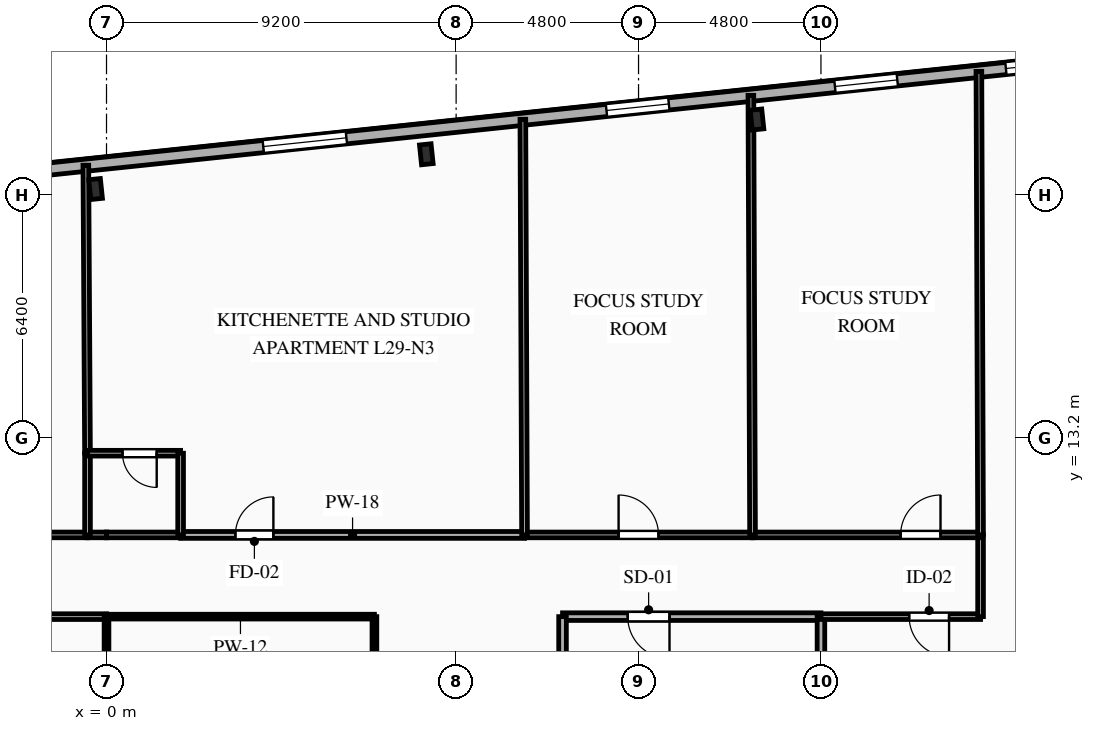
"""IFC4 building model, lengths in metres.
Left out: names, types, materials, properties, quantities, classifications, styles, units other than length and angle.
Written with IfcOpenShell. Run it as: python <this file> out.ifc"""

import sys

from ifc_helpers import new_model, si_unit, direction, frame, frame_2d, origin, origin_2d, place, context, subcontext, project, spatial, rectangle, i_section, extrude, element, fill, save


model = new_model("IFC4")
c1 = context("Model", 3, precision=1e-05, world=origin(), true_north=direction((0.0, 1.0)))
c2 = subcontext(c1, "Body", "Model", "MODEL_VIEW")
j1 = project(units=[si_unit("LENGTHUNIT", "METRE"), si_unit("PLANEANGLEUNIT", "RADIAN")], contexts=[c1])
p1 = place(None, origin())
s1 = spatial("IfcSite", under=j1, at=p1, CompositionType="ELEMENT")
p2 = place(p1, origin())
s2 = spatial("IfcBuilding", under=s1, at=p2, CompositionType="ELEMENT")
p3 = place(p2, frame((0.0, 0.0, 105.8)))
s3 = spatial("IfcBuildingStorey", under=s2, at=p3, CompositionType="ELEMENT", Elevation=105.8)
for number, where, z_axis, x_axis in (
    (1, (17.117, 21.58, 0.0), (0.0, 0.0, 1.0), (0.995, 0.105, 0.0)),
    (2, (8.415, 20.666, 0.0), (0.0, 0.0, 1.0), (0.995, 0.105, 0.0)),
    (3, (-0.287, 19.751, 0.0), (0.0, 0.0, 1.0), (0.995, 0.105, 0.0)),
):
    element("IfcColumn", number, at=place(p3, frame(where, z_axis=z_axis, x_axis=x_axis)), inside=s3, PredefinedType="COLUMN", context=c2, shape_type="SweptSolid", body=[
        extrude(i_section(OverallWidth=0.306, OverallDepth=0.524, WebThickness=0.021, FlangeThickness=0.04, FilletRadius=0.027, at=origin_2d()), origin(), (0.0, 0.0, 1.0), 3.35),
    ])
p4 = place(p3, frame((-27.107, 17.586, 0.0), z_axis=(0.0, 0.0, 1.0), x_axis=(0.994521628355, 0.104531003701, 0.0)))
e4 = element("IfcWall", 4, at=p4, inside=s3, PredefinedType="SOLIDWALL", context=c2, shape_type="SweptSolid", body=[
    extrude(rectangle(XDim=53.8, YDim=0.32, at=frame_2d((26.9, 0.0))), origin(), (0.0, 0.0, 1.0), 3.045),
])
p5 = place(p4, frame((1.482, 0.0, 0.85)))
e5 = element("IfcOpeningElement", 5, at=p5, cuts=e4, PredefinedType="OPENING", context=c2, shape_type="SweptSolid", body=[
    extrude(rectangle(XDim=1.6, YDim=1.85, at=frame_2d((0.8, 0.925))), frame((0.0, 0.17, 0.0), z_axis=(0.0, -1.0, 0.0), x_axis=(1.0, 0.0, 0.0)), (0.0, 0.0, 1.0), 0.34),
])
p6 = place(p4, frame((6.02, 0.0, 0.85)))
e6 = element("IfcOpeningElement", 6, at=p6, cuts=e4, PredefinedType="OPENING", context=c2, shape_type="SweptSolid", body=[
    extrude(rectangle(XDim=1.65, YDim=1.85, at=frame_2d((0.825, 0.925))), frame((0.0, 0.17, 0.0), z_axis=(0.0, -1.0, 0.0), x_axis=(1.0, 0.0, 0.0)), (0.0, 0.0, 1.0), 0.34),
])
p7 = place(p4, frame((11.584, 0.0, 0.85)))
e7 = element("IfcOpeningElement", 7, at=p7, cuts=e4, PredefinedType="OPENING", context=c2, shape_type="SweptSolid", body=[
    extrude(rectangle(XDim=1.65, YDim=1.85, at=frame_2d((0.825, 0.925))), frame((0.0, 0.17, 0.0), z_axis=(0.0, -1.0, 0.0), x_axis=(1.0, 0.0, 0.0)), (0.0, 0.0, 1.0), 0.34),
])
p8 = place(p4, frame((21.336, 0.0, 0.85)))
e8 = element("IfcOpeningElement", 8, at=p8, cuts=e4, PredefinedType="OPENING", context=c2, shape_type="SweptSolid", body=[
    extrude(rectangle(XDim=1.6, YDim=1.85, at=frame_2d((0.8, 0.925))), frame((0.0, 0.17, 0.0), z_axis=(0.0, -1.0, 0.0), x_axis=(1.0, 0.0, 0.0)), (0.0, 0.0, 1.0), 0.34),
])
p9 = place(p4, frame((31.404, 0.0, 0.85)))
e9 = element("IfcOpeningElement", 9, at=p9, cuts=e4, PredefinedType="OPENING", context=c2, shape_type="SweptSolid", body=[
    extrude(rectangle(XDim=2.2, YDim=1.85, at=frame_2d((1.1, 0.925))), frame((0.0, 0.17, 0.0), z_axis=(0.0, -1.0, 0.0), x_axis=(1.0, 0.0, 0.0)), (0.0, 0.0, 1.0), 0.34),
])
p10 = place(p4, frame((40.486, 0.0, 0.85)))
e10 = element("IfcOpeningElement", 10, at=p10, cuts=e4, PredefinedType="OPENING", context=c2, shape_type="SweptSolid", body=[
    extrude(rectangle(XDim=1.65, YDim=1.85, at=frame_2d((0.825, 0.925))), frame((0.0, 0.17, 0.0), z_axis=(0.0, -1.0, 0.0), x_axis=(1.0, 0.0, 0.0)), (0.0, 0.0, 1.0), 0.34),
])
p11 = place(p4, frame((46.53, 0.0, 0.85)))
e11 = element("IfcOpeningElement", 11, at=p11, cuts=e4, PredefinedType="OPENING", context=c2, shape_type="SweptSolid", body=[
    extrude(rectangle(XDim=1.65, YDim=1.85, at=frame_2d((0.825, 0.925))), frame((0.0, 0.17, 0.0), z_axis=(0.0, -1.0, 0.0), x_axis=(1.0, 0.0, 0.0)), (0.0, 0.0, 1.0), 0.34),
])
p12 = place(p4, frame((51.054, 0.0, 0.85)))
e12 = element("IfcOpeningElement", 12, at=p12, cuts=e4, PredefinedType="OPENING", context=c2, shape_type="SweptSolid", body=[
    extrude(rectangle(XDim=1.65, YDim=1.85, at=frame_2d((0.825, 0.925))), frame((0.0, 0.17, 0.0), z_axis=(0.0, -1.0, 0.0), x_axis=(1.0, 0.0, 0.0)), (0.0, 0.0, 1.0), 0.34),
])
p13 = place(p3, frame((18.8, 8.5, 0.0), z_axis=(0.0, 0.0, 1.0), x_axis=(-1.0, 0.0, 0.0)))
e13 = element("IfcWall", 13, at=p13, inside=s3, PredefinedType="PARTITIONING", context=c2, shape_type="SweptSolid", body=[
    extrude(rectangle(XDim=6.8, YDim=0.2, at=frame_2d((3.4, 0.0))), origin(), (0.0, 0.0, 1.0), 3.045),
])
p14 = place(p13, frame((3.985, 0.0, 0.0)))
e14 = element("IfcOpeningElement", 14, at=p14, cuts=e13, PredefinedType="OPENING", context=c2, shape_type="SweptSolid", body=[
    extrude(rectangle(XDim=1.1, YDim=2.15, at=frame_2d((0.55, 1.075))), frame((0.0, 0.11, 0.0), z_axis=(0.0, -1.0, 0.0), x_axis=(1.0, 0.0, 0.0)), (0.0, 0.0, 1.0), 0.22),
])
p15 = place(p3, frame((12.0, 8.5, 0.0), z_axis=(0.0, 0.0, 1.0), x_axis=(0.0, -1.0, 0.0)))
e15 = element("IfcWall", 15, at=p15, inside=s3, PredefinedType="PARTITIONING", context=c2, shape_type="SweptSolid", body=[
    extrude(rectangle(XDim=2.9, YDim=0.2, at=frame_2d((1.45, 0.0))), origin(), (0.0, 0.0, 1.0), 3.045),
])
p16 = place(p3, frame((18.8, 5.6, 0.0), z_axis=(0.0, 0.0, 1.0), x_axis=(0.0, 1.0, 0.0)))
e16 = element("IfcWall", 16, at=p16, inside=s3, PredefinedType="PARTITIONING", context=c2, shape_type="SweptSolid", body=[
    extrude(rectangle(XDim=2.9, YDim=0.2, at=frame_2d((1.45, 0.0))), origin(), (0.0, 0.0, 1.0), 2.53),
])
p17 = place(p3, frame((-9.65, 10.65, 0.0), z_axis=(0.0, 0.0, 1.0), x_axis=(1.0, 0.0, 0.0)))
e17 = element("IfcWall", 17, at=p17, inside=s3, PredefinedType="PARTITIONING", context=c2, shape_type="SweptSolid", body=[
    extrude(rectangle(XDim=9.15, YDim=0.15, at=frame_2d((4.575, 0.0))), origin(), (0.0, 0.0, 1.0), 3.045),
])
p18 = place(p17, frame((6.74, 0.0, 0.0)))
e18 = element("IfcOpeningElement", 18, at=p18, cuts=e17, PredefinedType="OPENING", context=c2, shape_type="SweptSolid", body=[
    extrude(rectangle(XDim=0.95, YDim=2.1, at=frame_2d((0.475, 1.05))), frame((0.0, 0.085, 0.0), z_axis=(0.0, -1.0, 0.0), x_axis=(1.0, 0.0, 0.0)), (0.0, 0.0, 1.0), 0.17),
])
p19 = place(p3, frame((-0.5, 10.65, 0.0), z_axis=(0.0, 0.0, 1.0), x_axis=(1.0, 0.0, 0.0)))
e19 = element("IfcWall", 19, at=p19, inside=s3, PredefinedType="PLUMBINGWALL", context=c2, shape_type="SweptSolid", body=[
    extrude(rectangle(XDim=0.5, YDim=0.15, at=frame_2d((0.25, 0.0))), origin(), (0.0, 0.0, 1.0), 3.045),
])
p20 = place(p3, frame((0.0, 8.5, 0.0), z_axis=(0.0, 0.0, 1.0), x_axis=(-1.0, 0.0, 0.0)))
e20 = element("IfcWall", 20, at=p20, inside=s3, PredefinedType="PARTITIONING", context=c2, shape_type="SweptSolid", body=[
    extrude(rectangle(XDim=7.05, YDim=0.15, at=frame_2d((3.525, 0.0))), origin(), (0.0, 0.0, 1.0), 3.045),
])
p21 = place(p3, frame((23.0, 8.5, 0.0), z_axis=(0.0, 0.0, 1.0), x_axis=(-1.0, 0.0, 0.0)))
e21 = element("IfcWall", 21, at=p21, inside=s3, PredefinedType="PARTITIONING", context=c2, shape_type="SweptSolid", body=[
    extrude(rectangle(XDim=4.2, YDim=0.15, at=frame_2d((2.1, 0.0))), origin(), (0.0, 0.0, 1.0), 3.045),
])
p22 = place(p21, frame((0.829, 0.0, 0.0)))
e22 = element("IfcOpeningElement", 22, at=p22, cuts=e21, PredefinedType="OPENING", context=c2, shape_type="SweptSolid", body=[
    extrude(rectangle(XDim=1.05, YDim=2.15, at=frame_2d((0.525, 1.075))), frame((0.0, 0.085, 0.0), z_axis=(0.0, -1.0, 0.0), x_axis=(1.0, 0.0, 0.0)), (0.0, 0.0, 1.0), 0.17),
])
p23 = place(p3, frame((23.0, 10.65, 0.0), z_axis=(0.0, 0.0, 1.0), x_axis=(0.0, -1.0, 0.0)))
e23 = element("IfcWall", 23, at=p23, inside=s3, PredefinedType="PARTITIONING", context=c2, shape_type="SweptSolid", body=[
    extrude(rectangle(XDim=2.15, YDim=0.15, at=frame_2d((1.075, 0.0))), origin(), (0.0, 0.0, 1.0), 3.045),
])
p24 = place(p3, frame((1.95, 10.65, 0.0), z_axis=(0.0, 0.0, 1.0), x_axis=(1.0, 0.0, 0.0)))
e24 = element("IfcWall", 24, at=p24, inside=s3, PredefinedType="PARTITIONING", context=c2, shape_type="SweptSolid", body=[
    extrude(rectangle(XDim=9.05, YDim=0.18, at=frame_2d((4.525, 0.0))), origin(), (0.0, 0.0, 1.0), 3.045),
])
p25 = place(p24, frame((1.441, 0.0, 0.0)))
e25 = element("IfcOpeningElement", 25, at=p25, cuts=e24, PredefinedType="OPENING", context=c2, shape_type="SweptSolid", body=[
    extrude(rectangle(XDim=1.0, YDim=2.15, at=frame_2d((0.5, 1.075))), frame((0.0, 0.1, 0.0), z_axis=(0.0, -1.0, 0.0), x_axis=(1.0, 0.0, 0.0)), (0.0, 0.0, 1.0), 0.2),
])
p26 = place(p3, frame((0.0, 10.65, 0.0), z_axis=(0.0, 0.0, 1.0), x_axis=(1.0, 0.0, 0.0)))
e26 = element("IfcWall", 26, at=p26, inside=s3, PredefinedType="PLUMBINGWALL", context=c2, shape_type="SweptSolid", body=[
    extrude(rectangle(XDim=1.95, YDim=0.15, at=frame_2d((0.975, 0.0))), origin(), (0.0, 0.0, 1.0), 3.045),
])
p27 = place(p3, frame((11.0, 10.65, 0.0), z_axis=(0.0, 0.0, 1.0), x_axis=(1.0, 0.0, 0.0)))
e27 = element("IfcWall", 27, at=p27, inside=s3, PredefinedType="PARTITIONING", context=c2, shape_type="SweptSolid", body=[
    extrude(rectangle(XDim=6.0, YDim=0.15, at=frame_2d((3.0, 0.0))), origin(), (0.0, 0.0, 1.0), 3.045),
])
p28 = place(p27, frame((2.475, 0.0, 0.0)))
e28 = element("IfcOpeningElement", 28, at=p28, cuts=e27, PredefinedType="OPENING", context=c2, shape_type="SweptSolid", body=[
    extrude(rectangle(XDim=1.05, YDim=2.15, at=frame_2d((0.525, 1.075))), frame((0.0, 0.085, 0.0), z_axis=(0.0, -1.0, 0.0), x_axis=(1.0, 0.0, 0.0)), (0.0, 0.0, 1.0), 0.17),
])
p29 = place(p3, frame((17.0, 10.65, 0.0), z_axis=(0.0, 0.0, 1.0), x_axis=(1.0, 0.0, 0.0)))
e29 = element("IfcWall", 29, at=p29, inside=s3, PredefinedType="PARTITIONING", context=c2, shape_type="SweptSolid", body=[
    extrude(rectangle(XDim=6.0, YDim=0.15, at=frame_2d((3.0, 0.0))), origin(), (0.0, 0.0, 1.0), 3.045),
])
p30 = place(p29, frame((3.896, 0.0, 0.0)))
e30 = element("IfcOpeningElement", 30, at=p30, cuts=e29, PredefinedType="OPENING", context=c2, shape_type="SweptSolid", body=[
    extrude(rectangle(XDim=1.05, YDim=2.15, at=frame_2d((0.525, 1.075))), frame((0.0, 0.085, 0.0), z_axis=(0.0, -1.0, 0.0), x_axis=(1.0, 0.0, 0.0)), (0.0, 0.0, 1.0), 0.17),
])
p31 = place(p3, frame((7.05, 8.5, 0.0), z_axis=(0.0, 0.0, 1.0), x_axis=(-1.0, 0.0, 0.0)))
e31 = element("IfcWall", 31, at=p31, inside=s3, PredefinedType="PARTITIONING", context=c2, shape_type="SweptSolid", body=[
    extrude(rectangle(XDim=7.05, YDim=0.125, at=frame_2d((3.525, 0.0))), origin(), (0.0, 0.0, 1.0), 3.045),
])
p32 = place(p3, frame((7.05, -5.6, 0.0), z_axis=(0.0, 0.0, 1.0), x_axis=(0.0, 1.0, 0.0)))
e32 = element("IfcWall", 32, at=p32, inside=s3, PredefinedType="PARTITIONING", context=c2, shape_type="SweptSolid", body=[
    extrude(rectangle(XDim=14.1, YDim=0.125, at=frame_2d((7.05, 0.0))), origin(), (0.0, 0.0, 1.0), 3.045),
])
p33 = place(p32, frame((5.076, 0.0, 0.0)))
e33 = element("IfcOpeningElement", 33, at=p33, cuts=e32, PredefinedType="OPENING", context=c2, shape_type="SweptSolid", body=[
    extrude(rectangle(XDim=0.95, YDim=2.1, at=frame_2d((0.475, 1.05))), frame((0.0, 0.073, 0.0), z_axis=(0.0, -1.0, 0.0), x_axis=(1.0, 0.0, 0.0)), (0.0, 0.0, 1.0), 0.145),
])
p34 = place(p3, frame((23.0, 10.65, 0.0), z_axis=(0.0, 0.0, 1.0), x_axis=(-0.0036027147, 0.999993510202, 0.0)))
e34 = element("IfcWall", 34, at=p34, inside=s3, PredefinedType="PARTITIONING", context=c2, shape_type="SweptSolid", body=[
    extrude(rectangle(XDim=12.198, YDim=0.15, at=frame_2d((6.099, 0.0))), origin(), (0.0, 0.0, 1.0), 3.045),
])
p35 = place(p3, frame((-0.544, 20.378, 0.0), z_axis=(0.0, 0.0, 1.0), x_axis=(0.005799245221, -0.999983184236, 0.0)))
e35 = element("IfcWall", 35, at=p35, inside=s3, PredefinedType="PARTITIONING", context=c2, shape_type="SweptSolid", body=[
    extrude(rectangle(XDim=7.578, YDim=0.15, at=frame_2d((3.789, 0.0))), origin(), (0.0, 0.0, 1.0), 3.045),
])
p36 = place(p3, frame((-0.5, 12.8, 0.0), z_axis=(0.0, 0.0, 1.0), x_axis=(0.0, -1.0, 0.0)))
e36 = element("IfcWall", 36, at=p36, inside=s3, PredefinedType="PLUMBINGWALL", context=c2, shape_type="SweptSolid", body=[
    extrude(rectangle(XDim=2.15, YDim=0.15, at=frame_2d((1.075, 0.0))), origin(), (0.0, 0.0, 1.0), 3.045),
])
p37 = place(p3, frame((1.95, 12.8, 0.0), z_axis=(0.0, 0.0, 1.0), x_axis=(-1.0, 0.0, 0.0)))
e37 = element("IfcWall", 37, at=p37, inside=s3, PredefinedType="PLUMBINGWALL", context=c2, shape_type="SweptSolid", body=[
    extrude(rectangle(XDim=2.45, YDim=0.15, at=frame_2d((1.225, 0.0))), origin(), (0.0, 0.0, 1.0), 3.045),
])
p38 = place(p37, frame((0.629, 0.0, 0.0)))
e38 = element("IfcOpeningElement", 38, at=p38, cuts=e37, PredefinedType="OPENING", context=c2, shape_type="SweptSolid", body=[
    extrude(rectangle(XDim=0.9, YDim=2.1, at=frame_2d((0.45, 1.05))), frame((0.0, 0.085, 0.0), z_axis=(0.0, -1.0, 0.0), x_axis=(1.0, 0.0, 0.0)), (0.0, 0.0, 1.0), 0.17),
])
p39 = place(p3, frame((1.95, 10.65, 0.0), z_axis=(0.0, 0.0, 1.0), x_axis=(0.0, 1.0, 0.0)))
e39 = element("IfcWall", 39, at=p39, inside=s3, PredefinedType="PLUMBINGWALL", context=c2, shape_type="SweptSolid", body=[
    extrude(rectangle(XDim=2.15, YDim=0.15, at=frame_2d((1.075, 0.0))), origin(), (0.0, 0.0, 1.0), 3.045),
])
p40 = place(p3, frame((10.956, 21.586, 0.0), z_axis=(0.0, 0.0, 1.0), x_axis=(0.004018183473, -0.999991927068, 0.0)))
e40 = element("IfcWall", 40, at=p40, inside=s3, PredefinedType="PARTITIONING", context=c2, shape_type="SweptSolid", body=[
    extrude(rectangle(XDim=10.937, YDim=0.15, at=frame_2d((5.468, 0.0))), origin(), (0.0, 0.0, 1.0), 3.045),
])
p41 = place(p3, frame((16.956, 22.217, 0.0), z_axis=(0.0, 0.0, 1.0), x_axis=(0.003799124105, -0.999992783302, 0.0)))
e41 = element("IfcWall", 41, at=p41, inside=s3, PredefinedType="PARTITIONING", context=c2, shape_type="SweptSolid", body=[
    extrude(rectangle(XDim=11.567, YDim=0.15, at=frame_2d((5.784, 0.0))), origin(), (0.0, 0.0, 1.0), 2.53),
])
p42 = place(p3, frame((0.0, 8.5, 0.0), z_axis=(0.0, 0.0, 1.0), x_axis=(0.0, -1.0, 0.0)))
e42 = element("IfcWall", 42, at=p42, inside=s3, PredefinedType="PARTITIONING", context=c2, shape_type="SweptSolid", body=[
    extrude(rectangle(XDim=14.1, YDim=0.125, at=frame_2d((7.05, 0.0))), origin(), (0.0, 0.0, 1.0), 3.045),
])
p43 = place(p9, origin())
e43 = element("IfcWindow", 43, at=p43, inside=s3, PartitioningType="SINGLE_PANEL", PredefinedType="WINDOW", context=c2, shape_type="SweptSolid", body=[
    extrude(rectangle(XDim=2.2, YDim=1.85, at=frame_2d((1.1, 0.925))), frame((0.0, 0.03, 0.0), z_axis=(0.0, -1.0, 0.0), x_axis=(1.0, 0.0, 0.0)), (0.0, 0.0, 1.0), 0.06),
])
fill(e9, e43)
p44 = place(p10, origin())
e44 = element("IfcWindow", 44, at=p44, inside=s3, PartitioningType="SINGLE_PANEL", PredefinedType="WINDOW", context=c2, shape_type="SweptSolid", body=[
    extrude(rectangle(XDim=1.65, YDim=1.85, at=frame_2d((0.825, 0.925))), frame((0.0, 0.03, 0.0), z_axis=(0.0, -1.0, 0.0), x_axis=(1.0, 0.0, 0.0)), (0.0, 0.0, 1.0), 0.06),
])
fill(e10, e44)
p45 = place(p11, origin())
e45 = element("IfcWindow", 45, at=p45, inside=s3, PartitioningType="SINGLE_PANEL", PredefinedType="WINDOW", context=c2, shape_type="SweptSolid", body=[
    extrude(rectangle(XDim=1.65, YDim=1.85, at=frame_2d((0.825, 0.925))), frame((0.0, 0.03, 0.0), z_axis=(0.0, -1.0, 0.0), x_axis=(1.0, 0.0, 0.0)), (0.0, 0.0, 1.0), 0.06),
])
fill(e11, e45)
p46 = place(p12, origin())
e46 = element("IfcWindow", 46, at=p46, inside=s3, PartitioningType="SINGLE_PANEL", PredefinedType="WINDOW", context=c2, shape_type="SweptSolid", body=[
    extrude(rectangle(XDim=1.65, YDim=1.85, at=frame_2d((0.825, 0.925))), frame((0.0, 0.03, 0.0), z_axis=(0.0, -1.0, 0.0), x_axis=(1.0, 0.0, 0.0)), (0.0, 0.0, 1.0), 0.06),
])
fill(e12, e46)
p47 = place(p14, origin())
e47 = element("IfcDoor", 47, at=p47, inside=s3, OperationType="SINGLE_SWING_LEFT", PredefinedType="DOOR", context=c2, shape_type="SweptSolid", body=[
    extrude(rectangle(XDim=1.1, YDim=2.15, at=frame_2d((0.55, 1.075))), frame((0.0, 0.025, 0.0), z_axis=(0.0, -1.0, 0.0), x_axis=(1.0, 0.0, 0.0)), (0.0, 0.0, 1.0), 0.05),
])
fill(e14, e47)
p48 = place(p22, origin())
e48 = element("IfcDoor", 48, at=p48, inside=s3, OperationType="SINGLE_SWING_LEFT", PredefinedType="DOOR", context=c2, shape_type="SweptSolid", body=[
    extrude(rectangle(XDim=1.05, YDim=2.15, at=frame_2d((0.525, 1.075))), frame((0.0, 0.025, 0.0), z_axis=(0.0, -1.0, 0.0), x_axis=(1.0, 0.0, 0.0)), (0.0, 0.0, 1.0), 0.05),
])
fill(e22, e48)
p49 = place(p25, origin())
e49 = element("IfcDoor", 49, at=p49, inside=s3, OperationType="SINGLE_SWING_RIGHT", PredefinedType="DOOR", context=c2, shape_type="SweptSolid", body=[
    extrude(rectangle(XDim=1.0, YDim=2.15, at=frame_2d((0.5, 1.075))), frame((0.0, 0.025, 0.0), z_axis=(0.0, -1.0, 0.0), x_axis=(1.0, 0.0, 0.0)), (0.0, 0.0, 1.0), 0.05),
])
fill(e25, e49)
p50 = place(p28, origin())
e50 = element("IfcDoor", 50, at=p50, inside=s3, OperationType="SINGLE_SWING_LEFT", PredefinedType="DOOR", context=c2, shape_type="SweptSolid", body=[
    extrude(rectangle(XDim=1.05, YDim=2.15, at=frame_2d((0.525, 1.075))), frame((0.0, 0.025, 0.0), z_axis=(0.0, -1.0, 0.0), x_axis=(1.0, 0.0, 0.0)), (0.0, 0.0, 1.0), 0.05),
])
fill(e28, e50)
p51 = place(p30, origin())
e51 = element("IfcDoor", 51, at=p51, inside=s3, OperationType="SINGLE_SWING_RIGHT", PredefinedType="DOOR", context=c2, shape_type="SweptSolid", body=[
    extrude(rectangle(XDim=1.05, YDim=2.15, at=frame_2d((0.525, 1.075))), frame((0.0, 0.025, 0.0), z_axis=(0.0, -1.0, 0.0), x_axis=(1.0, 0.0, 0.0)), (0.0, 0.0, 1.0), 0.05),
])
fill(e30, e51)
p52 = place(p38, origin())
e52 = element("IfcDoor", 52, at=p52, inside=s3, OperationType="SINGLE_SWING_LEFT", PredefinedType="DOOR", context=c2, shape_type="SweptSolid", body=[
    extrude(rectangle(XDim=0.9, YDim=2.1, at=frame_2d((0.45, 1.05))), frame((0.0, 0.025, 0.0), z_axis=(0.0, -1.0, 0.0), x_axis=(1.0, 0.0, 0.0)), (0.0, 0.0, 1.0), 0.05),
])
fill(e38, e52)
save(model, sys.argv[1])
